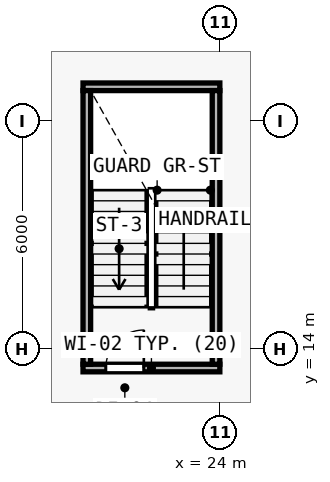
"""IFC4 building model, lengths in metres.
Left out: names, types, materials, properties, quantities, classifications, styles, units other than length and angle.
Written with IfcOpenShell. Run it as: python <this file> out.ifc"""

import sys

from ifc_helpers import new_model, si_unit, direction, frame, frame_2d, origin, place, context, subcontext, project, spatial, rectangle, extrude, element, fill, save


model = new_model("IFC4")
c1 = context("Model", 3, precision=1e-05, world=origin(), true_north=direction((0.0, 1.0)))
c2 = subcontext(c1, "Body", "Model", "MODEL_VIEW")
j1 = project(units=[si_unit("LENGTHUNIT", "METRE"), si_unit("PLANEANGLEUNIT", "RADIAN")], contexts=[c1])
p1 = place(None, origin())
s1 = spatial("IfcSite", under=j1, at=p1, CompositionType="ELEMENT")
p2 = place(p1, origin())
s2 = spatial("IfcBuilding", under=s1, at=p2, CompositionType="ELEMENT")
p3 = place(p2, frame((0.0, 0.0, 5.0)))
s3 = spatial("IfcBuildingStorey", under=s2, at=p3, CompositionType="ELEMENT", Elevation=5.0)
p4 = place(p3, frame((20.4, 13.5, 0.0), z_axis=(0.0, 0.0, 1.0), x_axis=(1.0, 0.0, 0.0)))
e1 = element("IfcWall", 1, at=p4, inside=s3, PredefinedType="SOLIDWALL", context=c2, shape_type="SweptSolid", body=[
    extrude(rectangle(XDim=3.6, YDim=0.2, at=frame_2d((1.8, 0.0))), origin(), (0.0, 0.0, 1.0), 3.92),
])
p5 = place(p4, frame((0.6, 0.0, 0.0)))
e2 = element("IfcOpeningElement", 2, at=p5, cuts=e1, PredefinedType="OPENING", context=c2, shape_type="SweptSolid", body=[
    extrude(rectangle(XDim=1.0, YDim=2.15, at=frame_2d((0.5, 1.075))), frame((0.0, 0.11, 0.0), z_axis=(0.0, -1.0, 0.0), x_axis=(1.0, 0.0, 0.0)), (0.0, 0.0, 1.0), 0.22),
])
p6 = place(p3, frame((20.4, 20.9, 0.0), z_axis=(0.0, 0.0, 1.0), x_axis=(1.0, 0.0, 0.0)))
e3 = element("IfcWall", 3, at=p6, inside=s3, PredefinedType="SOLIDWALL", context=c2, shape_type="SweptSolid", body=[
    extrude(rectangle(XDim=3.6, YDim=0.2, at=frame_2d((1.8, 0.0))), origin(), (0.0, 0.0, 1.0), 3.92),
])
for number, where, z_axis, x_axis in (
    (4, (20.5, 13.6, 0.0), (0.0, 0.0, 1.0), (0.0, 1.0, 0.0)),
    (5, (23.9, 13.6, 0.0), (0.0, 0.0, 1.0), (0.0, 1.0, 0.0)),
):
    element("IfcWall", number, at=place(p3, frame(where, z_axis=z_axis, x_axis=x_axis)), inside=s3, PredefinedType="SOLIDWALL", context=c2, shape_type="SweptSolid", body=[
        extrude(rectangle(XDim=7.2, YDim=0.2, at=frame_2d((3.6, 0.0))), origin(), (0.0, 0.0, 1.0), 3.92),
    ])
p7 = place(p5, origin())
e6 = element("IfcDoor", 6, at=p7, inside=s3, OperationType="SINGLE_SWING_RIGHT", PredefinedType="DOOR", context=c2, shape_type="SweptSolid", body=[
    extrude(rectangle(XDim=1.0, YDim=2.15, at=frame_2d((0.5, 1.075))), frame((0.0, 0.025, 0.0), z_axis=(0.0, -1.0, 0.0), x_axis=(1.0, 0.0, 0.0)), (0.0, 0.0, 1.0), 0.05),
])
fill(e2, e6)
save(model, sys.argv[1])
